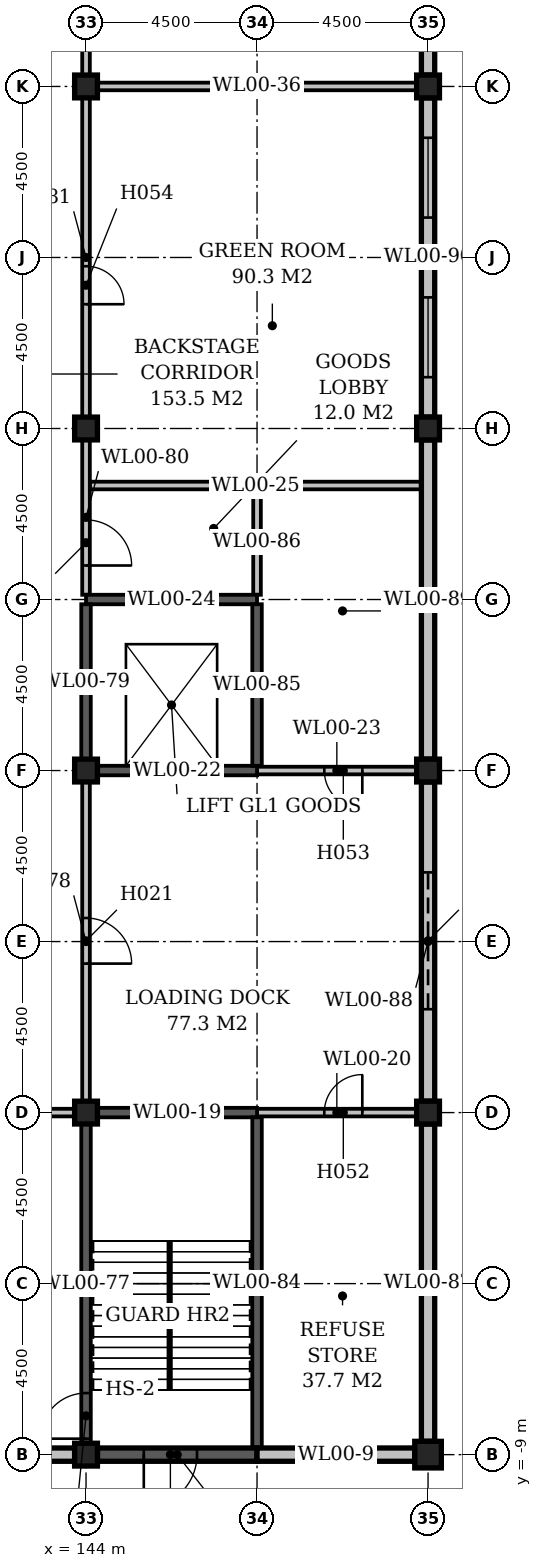
"""IFC4 building model, lengths in metres.
Left out: names, types, materials, properties, quantities, classifications, styles, units other than length and angle.
Written with IfcOpenShell. Run it as: python <this file> out.ifc"""

import sys

from ifc_helpers import new_model, si_unit, direction, frame, frame_2d, origin, origin_2d, place, context, subcontext, project, spatial, rectangle, extrude, element, fill, save


model = new_model("IFC4")
c1 = context("Model", 3, precision=1e-05, world=origin(), true_north=direction((0.0, 1.0)))
c2 = subcontext(c1, "Body", "Model", "MODEL_VIEW")
j1 = project(units=[si_unit("LENGTHUNIT", "METRE"), si_unit("PLANEANGLEUNIT", "RADIAN")], contexts=[c1])
p1 = place(None, origin())
s1 = spatial("IfcSite", under=j1, at=p1, CompositionType="ELEMENT")
p2 = place(p1, origin())
s2 = spatial("IfcBuilding", under=s1, at=p2, CompositionType="ELEMENT")
p3 = place(p2, origin())
s3 = spatial("IfcBuildingStorey", under=s2, at=p3, CompositionType="ELEMENT", Elevation=0.0)
for number, where, z_axis, x_axis in (
    (1, (144.0, -9.0, 0.0), (0.0, 0.0, 1.0), (1.0, 0.0, 0.0)),
    (2, (144.0, 0.0, 0.0), (0.0, 0.0, 1.0), (1.0, 0.0, 0.0)),
    (3, (144.0, 9.0, 0.0), (0.0, 0.0, 1.0), (1.0, 0.0, 0.0)),
    (4, (144.0, 18.0, 0.0), (0.0, 0.0, 1.0), (1.0, 0.0, 0.0)),
    (5, (144.0, 27.0, 0.0), (0.0, 0.0, 1.0), (1.0, 0.0, 0.0)),
):
    element("IfcColumn", number, at=place(p3, frame(where, z_axis=z_axis, x_axis=x_axis)), inside=s3, PredefinedType="COLUMN", context=c2, shape_type="SweptSolid", body=[
        extrude(rectangle(XDim=0.6, YDim=0.6, at=origin_2d()), origin(), (0.0, 0.0, 1.0), 8.7),
    ])
p4 = place(p3, frame((153.0, -9.0, 0.0), z_axis=(0.0, 0.0, 1.0), x_axis=(1.0, 0.0, 0.0)))
e6 = element("IfcColumn", 6, at=p4, inside=s3, PredefinedType="COLUMN", context=c2, shape_type="SweptSolid", body=[
    extrude(rectangle(XDim=0.7, YDim=0.7, at=origin_2d()), origin(), (0.0, 0.0, 1.0), 8.7),
])
for number, where, z_axis, x_axis in (
    (7, (153.0, 0.0, 0.0), (0.0, 0.0, 1.0), (1.0, 0.0, 0.0)),
    (8, (153.0, 9.0, 0.0), (0.0, 0.0, 1.0), (1.0, 0.0, 0.0)),
    (9, (153.0, 18.0, 0.0), (0.0, 0.0, 1.0), (1.0, 0.0, 0.0)),
    (10, (153.0, 27.0, 0.0), (0.0, 0.0, 1.0), (1.0, 0.0, 0.0)),
):
    element("IfcColumn", number, at=place(p3, frame(where, z_axis=z_axis, x_axis=x_axis)), inside=s3, PredefinedType="COLUMN", context=c2, shape_type="SweptSolid", body=[
        extrude(rectangle(XDim=0.6, YDim=0.6, at=origin_2d()), origin(), (0.0, 0.0, 1.0), 8.7),
    ])
p5 = place(p3, frame((135.3, -9.0, 0.0), z_axis=(0.0, 0.0, 1.0), x_axis=(1.0, 0.0, 0.0)))
e11 = element("IfcWall", 11, at=p5, inside=s3, PredefinedType="STANDARD", context=c2, shape_type="SweptSolid", body=[
    extrude(rectangle(XDim=8.4, YDim=0.35, at=frame_2d((4.2, 0.0))), origin(), (0.0, 0.0, 1.0), 8.1),
])
p6 = place(p5, frame((1.05, 0.0, 1.2)))
e12 = element("IfcOpeningElement", 12, at=p6, cuts=e11, PredefinedType="OPENING", context=c2, shape_type="SweptSolid", body=[
    extrude(rectangle(XDim=2.1, YDim=2.4, at=frame_2d((1.05, 1.2))), frame((0.0, 0.187, 0.0), z_axis=(0.0, -1.0, 0.0), x_axis=(1.0, 0.0, 0.0)), (0.0, 0.0, 1.0), 0.374),
])
p7 = place(p3, frame((144.3, -9.0, 0.0), z_axis=(0.0, 0.0, 1.0), x_axis=(1.0, 0.0, 0.0)))
e13 = element("IfcWall", 13, at=p7, inside=s3, PredefinedType="STANDARD", context=c2, shape_type="SweptSolid", body=[
    extrude(rectangle(XDim=4.2, YDim=0.35, at=frame_2d((2.1, 0.0))), origin(), (0.0, 0.0, 1.0), 9.0),
])
p8 = place(p7, frame((1.22, 0.0, 0.0)))
e14 = element("IfcOpeningElement", 14, at=p8, cuts=e13, PredefinedType="OPENING", context=c2, shape_type="SweptSolid", body=[
    extrude(rectangle(XDim=1.4, YDim=2.1, at=frame_2d((0.7, 1.05))), frame((0.0, 0.187, 0.0), z_axis=(0.0, -1.0, 0.0), x_axis=(1.0, 0.0, 0.0)), (0.0, 0.0, 1.0), 0.374),
])
p9 = place(p3, frame((148.5, -9.0, 0.0), z_axis=(0.0, 0.0, 1.0), x_axis=(1.0, 0.0, 0.0)))
e15 = element("IfcWall", 15, at=p9, inside=s3, PredefinedType="STANDARD", context=c2, shape_type="SweptSolid", body=[
    extrude(rectangle(XDim=4.15, YDim=0.35, at=frame_2d((2.075, 0.0))), origin(), (0.0, 0.0, 1.0), 8.1),
])
p10 = place(p3, frame((135.4, 0.0, 0.0), z_axis=(0.0, 0.0, 1.0), x_axis=(1.0, 0.0, 0.0)))
e16 = element("IfcWall", 16, at=p10, inside=s3, PredefinedType="STANDARD", context=c2, shape_type="SweptSolid", body=[
    extrude(rectangle(XDim=8.3, YDim=0.2, at=frame_2d((4.15, 0.0))), origin(), (0.0, 0.0, 1.0), 8.7),
])
p11 = place(p3, frame((144.3, 0.0, 0.0), z_axis=(0.0, 0.0, 1.0), x_axis=(1.0, 0.0, 0.0)))
e17 = element("IfcWall", 17, at=p11, inside=s3, PredefinedType="STANDARD", context=c2, shape_type="SweptSolid", body=[
    extrude(rectangle(XDim=4.2, YDim=0.25, at=frame_2d((2.1, 0.0))), origin(), (0.0, 0.0, 1.0), 9.0),
])
p12 = place(p3, frame((148.5, 0.0, 0.0), z_axis=(0.0, 0.0, 1.0), x_axis=(1.0, 0.0, 0.0)))
e18 = element("IfcWall", 18, at=p12, inside=s3, PredefinedType="STANDARD", context=c2, shape_type="SweptSolid", body=[
    extrude(rectangle(XDim=4.2, YDim=0.2, at=frame_2d((2.1, 0.0))), origin(), (0.0, 0.0, 1.0), 8.7),
])
p13 = place(p12, frame((1.77, 0.0, 0.0)))
e19 = element("IfcOpeningElement", 19, at=p13, cuts=e18, PredefinedType="OPENING", context=c2, shape_type="SweptSolid", body=[
    extrude(rectangle(XDim=1.0, YDim=2.1, at=frame_2d((0.5, 1.05))), frame((0.0, 0.112, 0.0), z_axis=(0.0, -1.0, 0.0), x_axis=(1.0, 0.0, 0.0)), (0.0, 0.0, 1.0), 0.224),
])
p14 = place(p3, frame((144.3, 9.0, 0.0), z_axis=(0.0, 0.0, 1.0), x_axis=(1.0, 0.0, 0.0)))
e20 = element("IfcWall", 20, at=p14, inside=s3, PredefinedType="STANDARD", context=c2, shape_type="SweptSolid", body=[
    extrude(rectangle(XDim=4.2, YDim=0.25, at=frame_2d((2.1, 0.0))), origin(), (0.0, 0.0, 1.0), 9.0),
])
p15 = place(p3, frame((148.5, 9.0, 0.0), z_axis=(0.0, 0.0, 1.0), x_axis=(1.0, 0.0, 0.0)))
e21 = element("IfcWall", 21, at=p15, inside=s3, PredefinedType="STANDARD", context=c2, shape_type="SweptSolid", body=[
    extrude(rectangle(XDim=4.2, YDim=0.2, at=frame_2d((2.1, 0.0))), origin(), (0.0, 0.0, 1.0), 8.7),
])
p16 = place(p15, frame((1.77, 0.0, 0.0)))
e22 = element("IfcOpeningElement", 22, at=p16, cuts=e21, PredefinedType="OPENING", context=c2, shape_type="SweptSolid", body=[
    extrude(rectangle(XDim=1.0, YDim=2.1, at=frame_2d((0.5, 1.05))), frame((0.0, 0.112, 0.0), z_axis=(0.0, -1.0, 0.0), x_axis=(1.0, 0.0, 0.0)), (0.0, 0.0, 1.0), 0.224),
])
p17 = place(p3, frame((144.0, 13.5, 0.0), z_axis=(0.0, 0.0, 1.0), x_axis=(1.0, 0.0, 0.0)))
e23 = element("IfcWall", 23, at=p17, inside=s3, PredefinedType="STANDARD", context=c2, shape_type="SweptSolid", body=[
    extrude(rectangle(XDim=4.5, YDim=0.25, at=frame_2d((2.25, 0.0))), origin(), (0.0, 0.0, 1.0), 9.0),
])
p18 = place(p17, frame((1.72, 0.0, 0.0)))
e24 = element("IfcOpeningElement", 24, at=p18, cuts=e23, PredefinedType="OPENING", context=c2, shape_type="SweptSolid", body=[
    extrude(rectangle(XDim=1.1, YDim=2.1, at=frame_2d((0.55, 1.05))), frame((0.0, 0.137, 0.0), z_axis=(0.0, -1.0, 0.0), x_axis=(1.0, 0.0, 0.0)), (0.0, 0.0, 1.0), 0.274),
])
p19 = place(p3, frame((144.1, 16.5, 0.0), z_axis=(0.0, 0.0, 1.0), x_axis=(1.0, 0.0, 0.0)))
e25 = element("IfcWall", 25, at=p19, inside=s3, PredefinedType="STANDARD", context=c2, shape_type="SweptSolid", body=[
    extrude(rectangle(XDim=8.725, YDim=0.2, at=frame_2d((4.362, 0.0))), origin(), (0.0, 0.0, 1.0), 8.7),
])
p20 = place(p3, frame((144.3, 27.0, 0.0), z_axis=(0.0, 0.0, 1.0), x_axis=(1.0, 0.0, 0.0)))
e26 = element("IfcWall", 26, at=p20, inside=s3, PredefinedType="STANDARD", context=c2, shape_type="SweptSolid", body=[
    extrude(rectangle(XDim=8.4, YDim=0.2, at=frame_2d((4.2, 0.0))), origin(), (0.0, 0.0, 1.0), 8.7),
])
p21 = place(p3, frame((144.0, -8.7, 0.0), z_axis=(0.0, 0.0, 1.0), x_axis=(0.0, 1.0, 0.0)))
e27 = element("IfcWall", 27, at=p21, inside=s3, PredefinedType="STANDARD", context=c2, shape_type="SweptSolid", body=[
    extrude(rectangle(XDim=8.4, YDim=0.25, at=frame_2d((4.2, 0.0))), origin(), (0.0, 0.0, 1.0), 9.0),
])
p22 = place(p21, frame((0.12, 0.0, 0.0)))
e28 = element("IfcOpeningElement", 28, at=p22, cuts=e27, PredefinedType="OPENING", context=c2, shape_type="SweptSolid", body=[
    extrude(rectangle(XDim=1.2, YDim=2.1, at=frame_2d((0.6, 1.05))), frame((0.0, 0.137, 0.0), z_axis=(0.0, -1.0, 0.0), x_axis=(1.0, 0.0, 0.0)), (0.0, 0.0, 1.0), 0.274),
])
p23 = place(p3, frame((144.0, 0.3, 0.0), z_axis=(0.0, 0.0, 1.0), x_axis=(0.0, 1.0, 0.0)))
e29 = element("IfcWall", 29, at=p23, inside=s3, PredefinedType="STANDARD", context=c2, shape_type="SweptSolid", body=[
    extrude(rectangle(XDim=8.4, YDim=0.2, at=frame_2d((4.2, 0.0))), origin(), (0.0, 0.0, 1.0), 8.7),
])
p24 = place(p23, frame((3.62, 0.0, 0.0)))
e30 = element("IfcOpeningElement", 30, at=p24, cuts=e29, PredefinedType="OPENING", context=c2, shape_type="SweptSolid", body=[
    extrude(rectangle(XDim=1.2, YDim=2.1, at=frame_2d((0.6, 1.05))), frame((0.0, 0.112, 0.0), z_axis=(0.0, -1.0, 0.0), x_axis=(1.0, 0.0, 0.0)), (0.0, 0.0, 1.0), 0.224),
])
p25 = place(p3, frame((144.0, 9.3, 0.0), z_axis=(0.0, 0.0, 1.0), x_axis=(0.0, 1.0, 0.0)))
e31 = element("IfcWall", 31, at=p25, inside=s3, PredefinedType="STANDARD", context=c2, shape_type="SweptSolid", body=[
    extrude(rectangle(XDim=4.075, YDim=0.25, at=frame_2d((2.038, 0.0))), origin(), (0.0, 0.0, 1.0), 9.0),
])
p26 = place(p3, frame((144.0, 13.625, 0.0), z_axis=(0.0, 0.0, 1.0), x_axis=(0.0, 1.0, 0.0)))
e32 = element("IfcWall", 32, at=p26, inside=s3, PredefinedType="STANDARD", context=c2, shape_type="SweptSolid", body=[
    extrude(rectangle(XDim=4.075, YDim=0.2, at=frame_2d((2.038, 0.0))), origin(), (0.0, 0.0, 1.0), 8.7),
])
p27 = place(p26, frame((0.77, 0.0, 0.0)))
e33 = element("IfcOpeningElement", 33, at=p27, cuts=e32, PredefinedType="OPENING", context=c2, shape_type="SweptSolid", body=[
    extrude(rectangle(XDim=1.2, YDim=2.1, at=frame_2d((0.6, 1.05))), frame((0.0, 0.112, 0.0), z_axis=(0.0, -1.0, 0.0), x_axis=(1.0, 0.0, 0.0)), (0.0, 0.0, 1.0), 0.224),
])
p28 = place(p3, frame((144.0, 18.3, 0.0), z_axis=(0.0, 0.0, 1.0), x_axis=(0.0, 1.0, 0.0)))
e34 = element("IfcWall", 34, at=p28, inside=s3, PredefinedType="STANDARD", context=c2, shape_type="SweptSolid", body=[
    extrude(rectangle(XDim=8.4, YDim=0.2, at=frame_2d((4.2, 0.0))), origin(), (0.0, 0.0, 1.0), 8.7),
])
p29 = place(p28, frame((2.97, 0.0, 0.0)))
e35 = element("IfcOpeningElement", 35, at=p29, cuts=e34, PredefinedType="OPENING", context=c2, shape_type="SweptSolid", body=[
    extrude(rectangle(XDim=1.0, YDim=2.1, at=frame_2d((0.5, 1.05))), frame((0.0, 0.112, 0.0), z_axis=(0.0, -1.0, 0.0), x_axis=(1.0, 0.0, 0.0)), (0.0, 0.0, 1.0), 0.224),
])
p30 = place(p3, frame((144.0, 27.3, 0.0), z_axis=(0.0, 0.0, 1.0), x_axis=(0.0, 1.0, 0.0)))
e36 = element("IfcWall", 36, at=p30, inside=s3, PredefinedType="STANDARD", context=c2, shape_type="SweptSolid", body=[
    extrude(rectangle(XDim=8.4, YDim=0.2, at=frame_2d((4.2, 0.0))), origin(), (0.0, 0.0, 1.0), 8.7),
])
p31 = place(p30, frame((3.32, 0.0, 0.0)))
e37 = element("IfcOpeningElement", 37, at=p31, cuts=e36, PredefinedType="OPENING", context=c2, shape_type="SweptSolid", body=[
    extrude(rectangle(XDim=1.8, YDim=2.4, at=frame_2d((0.9, 1.2))), frame((0.0, 0.112, 0.0), z_axis=(0.0, -1.0, 0.0), x_axis=(1.0, 0.0, 0.0)), (0.0, 0.0, 1.0), 0.224),
])
p32 = place(p3, frame((148.5, -8.825, 0.0), z_axis=(0.0, 0.0, 1.0), x_axis=(0.0, 1.0, 0.0)))
e38 = element("IfcWall", 38, at=p32, inside=s3, PredefinedType="STANDARD", context=c2, shape_type="SweptSolid", body=[
    extrude(rectangle(XDim=8.7, YDim=0.25, at=frame_2d((4.35, 0.0))), origin(), (0.0, 0.0, 1.0), 9.0),
])
p33 = place(p3, frame((148.5, 9.125, 0.0), z_axis=(0.0, 0.0, 1.0), x_axis=(0.0, 1.0, 0.0)))
e39 = element("IfcWall", 39, at=p33, inside=s3, PredefinedType="STANDARD", context=c2, shape_type="SweptSolid", body=[
    extrude(rectangle(XDim=4.25, YDim=0.25, at=frame_2d((2.125, 0.0))), origin(), (0.0, 0.0, 1.0), 9.0),
])
p34 = place(p3, frame((148.5, 13.625, 0.0), z_axis=(0.0, 0.0, 1.0), x_axis=(0.0, 1.0, 0.0)))
e40 = element("IfcWall", 40, at=p34, inside=s3, PredefinedType="STANDARD", context=c2, shape_type="SweptSolid", body=[
    extrude(rectangle(XDim=2.775, YDim=0.2, at=frame_2d((1.387, 0.0))), origin(), (0.0, 0.0, 1.0), 8.7),
])
p35 = place(p3, frame((153.0, -8.65, 0.0), z_axis=(0.0, 0.0, 1.0), x_axis=(0.0, 1.0, 0.0)))
e41 = element("IfcWall", 41, at=p35, inside=s3, PredefinedType="STANDARD", context=c2, shape_type="SweptSolid", body=[
    extrude(rectangle(XDim=8.35, YDim=0.35, at=frame_2d((4.175, 0.0))), origin(), (0.0, 0.0, 1.0), 8.1),
])
p36 = place(p3, frame((153.0, 0.3, 0.0), z_axis=(0.0, 0.0, 1.0), x_axis=(0.0, 1.0, 0.0)))
e42 = element("IfcWall", 42, at=p36, inside=s3, PredefinedType="STANDARD", context=c2, shape_type="SweptSolid", body=[
    extrude(rectangle(XDim=8.4, YDim=0.35, at=frame_2d((4.2, 0.0))), origin(), (0.0, 0.0, 1.0), 8.1),
])
p37 = place(p36, frame((2.42, 0.0, 0.0)))
e43 = element("IfcOpeningElement", 43, at=p37, cuts=e42, PredefinedType="OPENING", context=c2, shape_type="SweptSolid", body=[
    extrude(rectangle(XDim=3.6, YDim=4.2, at=frame_2d((1.8, 2.1))), frame((0.0, 0.187, 0.0), z_axis=(0.0, -1.0, 0.0), x_axis=(1.0, 0.0, 0.0)), (0.0, 0.0, 1.0), 0.374),
])
p38 = place(p3, frame((153.0, 9.3, 0.0), z_axis=(0.0, 0.0, 1.0), x_axis=(0.0, 1.0, 0.0)))
e44 = element("IfcWall", 44, at=p38, inside=s3, PredefinedType="STANDARD", context=c2, shape_type="SweptSolid", body=[
    extrude(rectangle(XDim=8.4, YDim=0.35, at=frame_2d((4.2, 0.0))), origin(), (0.0, 0.0, 1.0), 8.1),
])
p39 = place(p3, frame((153.0, 18.3, 0.0), z_axis=(0.0, 0.0, 1.0), x_axis=(0.0, 1.0, 0.0)))
e45 = element("IfcWall", 45, at=p39, inside=s3, PredefinedType="STANDARD", context=c2, shape_type="SweptSolid", body=[
    extrude(rectangle(XDim=8.4, YDim=0.35, at=frame_2d((4.2, 0.0))), origin(), (0.0, 0.0, 1.0), 8.1),
])
p40 = place(p39, frame((1.05, 0.0, 1.2)))
e46 = element("IfcOpeningElement", 46, at=p40, cuts=e45, PredefinedType="OPENING", context=c2, shape_type="SweptSolid", body=[
    extrude(rectangle(XDim=2.1, YDim=2.4, at=frame_2d((1.05, 1.2))), frame((0.0, 0.187, 0.0), z_axis=(0.0, -1.0, 0.0), x_axis=(1.0, 0.0, 0.0)), (0.0, 0.0, 1.0), 0.374),
])
p41 = place(p39, frame((5.25, 0.0, 1.2)))
e47 = element("IfcOpeningElement", 47, at=p41, cuts=e45, PredefinedType="OPENING", context=c2, shape_type="SweptSolid", body=[
    extrude(rectangle(XDim=2.1, YDim=2.4, at=frame_2d((1.05, 1.2))), frame((0.0, 0.187, 0.0), z_axis=(0.0, -1.0, 0.0), x_axis=(1.0, 0.0, 0.0)), (0.0, 0.0, 1.0), 0.374),
])
p42 = place(p3, frame((153.0, 27.3, 0.0), z_axis=(0.0, 0.0, 1.0), x_axis=(0.0, 1.0, 0.0)))
e48 = element("IfcWall", 48, at=p42, inside=s3, PredefinedType="STANDARD", context=c2, shape_type="SweptSolid", body=[
    extrude(rectangle(XDim=8.4, YDim=0.35, at=frame_2d((4.2, 0.0))), origin(), (0.0, 0.0, 1.0), 8.1),
])
p43 = place(p42, frame((1.05, 0.0, 1.2)))
e49 = element("IfcOpeningElement", 49, at=p43, cuts=e48, PredefinedType="OPENING", context=c2, shape_type="SweptSolid", body=[
    extrude(rectangle(XDim=2.1, YDim=2.4, at=frame_2d((1.05, 1.2))), frame((0.0, 0.187, 0.0), z_axis=(0.0, -1.0, 0.0), x_axis=(1.0, 0.0, 0.0)), (0.0, 0.0, 1.0), 0.374),
])
p44 = place(p42, frame((5.25, 0.0, 1.2)))
e50 = element("IfcOpeningElement", 50, at=p44, cuts=e48, PredefinedType="OPENING", context=c2, shape_type="SweptSolid", body=[
    extrude(rectangle(XDim=2.1, YDim=2.4, at=frame_2d((1.05, 1.2))), frame((0.0, 0.187, 0.0), z_axis=(0.0, -1.0, 0.0), x_axis=(1.0, 0.0, 0.0)), (0.0, 0.0, 1.0), 0.374),
])
p45 = place(p24, frame((1.2, 0.0, 0.0), z_axis=(0.0, 0.0, 1.0), x_axis=(-1.0, 0.0, 0.0)))
e51 = element("IfcDoor", 51, at=p45, inside=s3, OperationType="SINGLE_SWING_RIGHT", PredefinedType="DOOR", context=c2, shape_type="SweptSolid", body=[
    extrude(rectangle(XDim=1.2, YDim=2.1, at=frame_2d((0.6, 1.05))), frame((0.0, 0.025, 0.0), z_axis=(0.0, -1.0, 0.0), x_axis=(1.0, 0.0, 0.0)), (0.0, 0.0, 1.0), 0.05),
])
fill(e30, e51)
p46 = place(p8, frame((1.4, 0.0, 0.0), z_axis=(0.0, 0.0, 1.0), x_axis=(-1.0, 0.0, 0.0)))
e52 = element("IfcDoor", 52, at=p46, inside=s3, OperationType="DOUBLE_DOOR_SINGLE_SWING", PredefinedType="DOOR", context=c2, shape_type="SweptSolid", body=[
    extrude(rectangle(XDim=1.4, YDim=2.1, at=frame_2d((0.7, 1.05))), frame((0.0, 0.025, 0.0), z_axis=(0.0, -1.0, 0.0), x_axis=(1.0, 0.0, 0.0)), (0.0, 0.0, 1.0), 0.05),
])
fill(e14, e52)
p47 = place(p37, frame((3.6, 0.0, 0.0), z_axis=(0.0, 0.0, 1.0), x_axis=(-1.0, 0.0, 0.0)))
e53 = element("IfcDoor", 53, at=p47, inside=s3, OperationType="ROLLINGUP", PredefinedType="DOOR", context=c2, shape_type="SweptSolid", body=[
    extrude(rectangle(XDim=3.6, YDim=4.2, at=frame_2d((1.8, 2.1))), frame((0.0, 0.025, 0.0), z_axis=(0.0, -1.0, 0.0), x_axis=(1.0, 0.0, 0.0)), (0.0, 0.0, 1.0), 0.05),
])
fill(e43, e53)
p48 = place(p27, frame((1.2, 0.0, 0.0), z_axis=(0.0, 0.0, 1.0), x_axis=(-1.0, 0.0, 0.0)))
e54 = element("IfcDoor", 54, at=p48, inside=s3, OperationType="SINGLE_SWING_RIGHT", PredefinedType="DOOR", context=c2, shape_type="SweptSolid", body=[
    extrude(rectangle(XDim=1.2, YDim=2.1, at=frame_2d((0.6, 1.05))), frame((0.0, 0.025, 0.0), z_axis=(0.0, -1.0, 0.0), x_axis=(1.0, 0.0, 0.0)), (0.0, 0.0, 1.0), 0.05),
])
fill(e33, e54)
p49 = place(p22, origin())
e55 = element("IfcDoor", 55, at=p49, inside=s3, OperationType="SINGLE_SWING_LEFT", PredefinedType="DOOR", context=c2, shape_type="SweptSolid", body=[
    extrude(rectangle(XDim=1.2, YDim=2.1, at=frame_2d((0.6, 1.05))), frame((0.0, 0.025, 0.0), z_axis=(0.0, -1.0, 0.0), x_axis=(1.0, 0.0, 0.0)), (0.0, 0.0, 1.0), 0.05),
])
fill(e28, e55)
p50 = place(p13, frame((1.0, 0.0, 0.0), z_axis=(0.0, 0.0, 1.0), x_axis=(-1.0, 0.0, 0.0)))
e56 = element("IfcDoor", 56, at=p50, inside=s3, OperationType="SINGLE_SWING_LEFT", PredefinedType="DOOR", context=c2, shape_type="SweptSolid", body=[
    extrude(rectangle(XDim=1.0, YDim=2.1, at=frame_2d((0.5, 1.05))), frame((0.0, 0.025, 0.0), z_axis=(0.0, -1.0, 0.0), x_axis=(1.0, 0.0, 0.0)), (0.0, 0.0, 1.0), 0.05),
])
fill(e19, e56)
p51 = place(p16, origin())
e57 = element("IfcDoor", 57, at=p51, inside=s3, OperationType="SINGLE_SWING_RIGHT", PredefinedType="DOOR", context=c2, shape_type="SweptSolid", body=[
    extrude(rectangle(XDim=1.0, YDim=2.1, at=frame_2d((0.5, 1.05))), frame((0.0, 0.025, 0.0), z_axis=(0.0, -1.0, 0.0), x_axis=(1.0, 0.0, 0.0)), (0.0, 0.0, 1.0), 0.05),
])
fill(e22, e57)
p52 = place(p29, frame((1.0, 0.0, 0.0), z_axis=(0.0, 0.0, 1.0), x_axis=(-1.0, 0.0, 0.0)))
e58 = element("IfcDoor", 58, at=p52, inside=s3, OperationType="SINGLE_SWING_RIGHT", PredefinedType="DOOR", context=c2, shape_type="SweptSolid", body=[
    extrude(rectangle(XDim=1.0, YDim=2.1, at=frame_2d((0.5, 1.05))), frame((0.0, 0.025, 0.0), z_axis=(0.0, -1.0, 0.0), x_axis=(1.0, 0.0, 0.0)), (0.0, 0.0, 1.0), 0.05),
])
fill(e35, e58)
p53 = place(p18, origin())
e59 = element("IfcDoor", 59, at=p53, inside=s3, OperationType="SLIDING_TO_LEFT", PredefinedType="DOOR", context=c2, shape_type="SweptSolid", body=[
    extrude(rectangle(XDim=1.1, YDim=2.1, at=frame_2d((0.55, 1.05))), frame((0.0, 0.025, 0.0), z_axis=(0.0, -1.0, 0.0), x_axis=(1.0, 0.0, 0.0)), (0.0, 0.0, 1.0), 0.05),
])
fill(e24, e59)
p54 = place(p40, origin())
e60 = element("IfcWindow", 60, at=p54, inside=s3, PartitioningType="SINGLE_PANEL", PredefinedType="WINDOW", context=c2, shape_type="SweptSolid", body=[
    extrude(rectangle(XDim=2.1, YDim=2.4, at=frame_2d((1.05, 1.2))), frame((0.0, 0.03, 0.0), z_axis=(0.0, -1.0, 0.0), x_axis=(1.0, 0.0, 0.0)), (0.0, 0.0, 1.0), 0.06),
])
fill(e46, e60)
p55 = place(p41, origin())
e61 = element("IfcWindow", 61, at=p55, inside=s3, PartitioningType="SINGLE_PANEL", PredefinedType="WINDOW", context=c2, shape_type="SweptSolid", body=[
    extrude(rectangle(XDim=2.1, YDim=2.4, at=frame_2d((1.05, 1.2))), frame((0.0, 0.03, 0.0), z_axis=(0.0, -1.0, 0.0), x_axis=(1.0, 0.0, 0.0)), (0.0, 0.0, 1.0), 0.06),
])
fill(e47, e61)
save(model, sys.argv[1])
